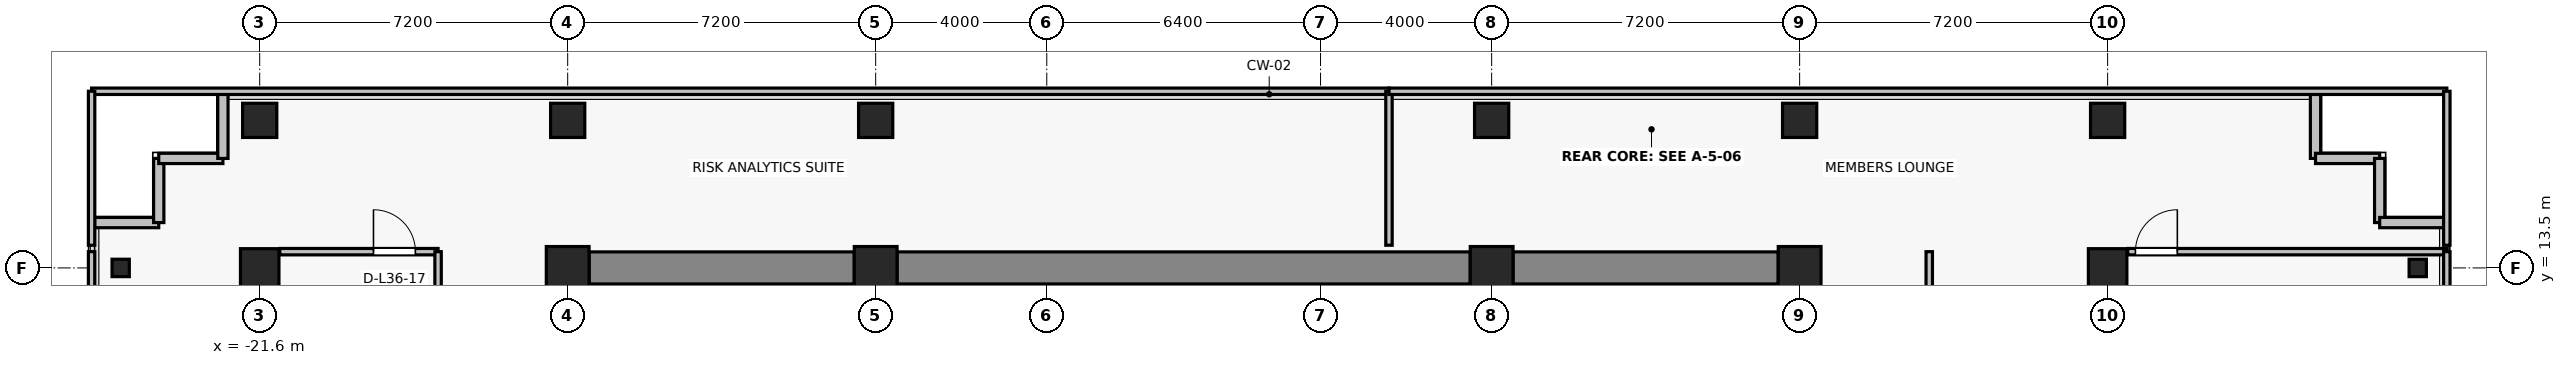
"""IFC4 building model, lengths in metres.
Left out: names, types, materials, properties, quantities, classifications, styles, units other than length and angle.
Written with IfcOpenShell. Run it as: python <this file> out.ifc"""

import sys

from ifc_helpers import new_model, si_unit, direction, frame, frame_2d, origin, origin_2d, place, context, subcontext, project, spatial, rectangle, i_section, extrude, source, transform, mapped, element, fill, save


model = new_model("IFC4")
c1 = context("Model", 3, precision=1e-05, world=origin(), true_north=direction((0.0, 1.0)))
c2 = subcontext(c1, "Body", "Model", "MODEL_VIEW")
j1 = project(units=[si_unit("LENGTHUNIT", "METRE"), si_unit("PLANEANGLEUNIT", "RADIAN")], contexts=[c1])
p1 = place(None, origin())
s1 = spatial("IfcSite", under=j1, at=p1, CompositionType="ELEMENT")
p2 = place(p1, origin())
s2 = spatial("IfcBuilding", under=s1, at=p2, CompositionType="ELEMENT")
p3 = place(p2, frame((0.0, 0.0, 129.7)))
s3 = spatial("IfcBuildingStorey", under=s2, at=p3, CompositionType="ELEMENT", Elevation=129.7)
for number, where, z_axis, x_axis in (
    (1, (-14.4, 13.5, 0.0), (0.0, 0.0, 1.0), (1.0, 0.0, 0.0)),
    (2, (-7.2, 13.5, 0.0), (0.0, 0.0, 1.0), (1.0, 0.0, 0.0)),
    (3, (7.2, 13.5, 0.0), (0.0, 0.0, 1.0), (1.0, 0.0, 0.0)),
    (4, (14.4, 13.5, 0.0), (0.0, 0.0, 1.0), (1.0, 0.0, 0.0)),
):
    element("IfcColumn", number, at=place(p3, frame(where, z_axis=z_axis, x_axis=x_axis)), inside=s3, PredefinedType="COLUMN", context=c2, shape_type="SweptSolid", body=[
        extrude(rectangle(XDim=1.0, YDim=1.0, at=origin_2d()), origin(), (0.0, 0.0, 1.0), 3.3),
    ])
for number, where, z_axis, x_axis in (
    (5, (-21.6, 13.5, 0.0), (0.0, 0.0, 1.0), (1.0, 0.0, 0.0)),
    (6, (21.6, 13.5, 0.0), (0.0, 0.0, 1.0), (1.0, 0.0, 0.0)),
):
    element("IfcColumn", number, at=place(p3, frame(where, z_axis=z_axis, x_axis=x_axis)), inside=s3, PredefinedType="COLUMN", context=c2, shape_type="SweptSolid", body=[
        extrude(rectangle(XDim=0.9, YDim=0.9, at=origin_2d()), origin(), (0.0, 0.0, 1.0), 3.3),
    ])
for number, where, z_axis, x_axis in (
    (7, (-14.4, 16.95, 0.0), (0.0, 0.0, 1.0), (1.0, 0.0, 0.0)),
    (8, (-7.2, 16.95, 0.0), (0.0, 0.0, 1.0), (1.0, 0.0, 0.0)),
    (9, (7.2, 16.95, 0.0), (0.0, 0.0, 1.0), (1.0, 0.0, 0.0)),
    (10, (14.4, 16.95, 0.0), (0.0, 0.0, 1.0), (1.0, 0.0, 0.0)),
    (11, (-21.6, 16.95, 0.0), (0.0, 0.0, 1.0), (1.0, 0.0, 0.0)),
    (12, (21.6, 16.95, 0.0), (0.0, 0.0, 1.0), (1.0, 0.0, 0.0)),
):
    element("IfcColumn", number, at=place(p3, frame(where, z_axis=z_axis, x_axis=x_axis)), inside=s3, PredefinedType="COLUMN", context=c2, shape_type="SweptSolid", body=[
        extrude(rectangle(XDim=0.8, YDim=0.8, at=origin_2d()), origin(), (0.0, 0.0, 1.0), 3.3),
    ])
for number, where, z_axis, x_axis in (
    (13, (-24.85, 13.5, 0.0), (0.0, 0.0, 1.0), (1.0, 0.0, 0.0)),
    (14, (28.85, 13.5, 0.0), (0.0, 0.0, 1.0), (1.0, 0.0, 0.0)),
):
    element("IfcColumn", number, at=place(p3, frame(where, z_axis=z_axis, x_axis=x_axis)), inside=s3, PredefinedType="COLUMN", context=c2, shape_type="SweptSolid", body=[
        extrude(i_section(OverallWidth=0.404, OverallDepth=0.407, WebThickness=0.022, FlangeThickness=0.032, FilletRadius=0.015, at=origin_2d()), origin(), (0.0, 0.0, 1.0), 3.3),
    ])
p4 = place(p3, frame((-13.9, 13.5, 0.0), z_axis=(0.0, 0.0, 1.0), x_axis=(1.0, 0.0, 0.0)))
e15 = element("IfcWall", 15, at=p4, inside=s3, PredefinedType="SHEAR", context=c2, shape_type="SweptSolid", body=[
    extrude(rectangle(XDim=6.2, YDim=0.75, at=frame_2d((3.1, 0.0))), origin(), (0.0, 0.0, 1.0), 3.075),
])
p5 = place(p3, frame((-6.7, 13.5, 0.0), z_axis=(0.0, 0.0, 1.0), x_axis=(1.0, 0.0, 0.0)))
e16 = element("IfcWall", 16, at=p5, inside=s3, PredefinedType="SHEAR", context=c2, shape_type="SweptSolid", body=[
    extrude(rectangle(XDim=13.4, YDim=0.75, at=frame_2d((6.7, 0.0))), origin(), (0.0, 0.0, 1.0), 3.075),
])
p6 = place(p3, frame((7.7, 13.5, 0.0), z_axis=(0.0, 0.0, 1.0), x_axis=(1.0, 0.0, 0.0)))
e17 = element("IfcWall", 17, at=p6, inside=s3, PredefinedType="SHEAR", context=c2, shape_type="SweptSolid", body=[
    extrude(rectangle(XDim=6.2, YDim=0.75, at=frame_2d((3.1, 0.0))), origin(), (0.0, 0.0, 1.0), 3.075),
])
for number, where, z_axis, x_axis in (
    (18, (-23.96, 14.56, 0.0), (0.0, 0.0, 1.0), (-1.0, 0.0, 0.0)),
    (19, (-23.96, 16.06, 0.0), (0.0, 0.0, 1.0), (0.0, -1.0, 0.0)),
    (20, (-22.46, 16.06, 0.0), (0.0, 0.0, 1.0), (-1.0, 0.0, 0.0)),
):
    element("IfcWall", number, at=place(p3, frame(where, z_axis=z_axis, x_axis=x_axis)), inside=s3, PredefinedType="SOLIDWALL", context=c2, shape_type="SweptSolid", body=[
        extrude(rectangle(XDim=1.5, YDim=0.24, at=frame_2d((0.75, 0.0))), origin(), (0.0, 0.0, 1.0), 3.075),
    ])
p7 = place(p3, frame((-22.46, 17.56, 0.0), z_axis=(0.0, 0.0, 1.0), x_axis=(0.0, -1.0, 0.0)))
e21 = element("IfcWall", 21, at=p7, inside=s3, PredefinedType="SOLIDWALL", context=c2, shape_type="SweptSolid", body=[
    extrude(rectangle(XDim=1.5, YDim=0.24, at=frame_2d((0.75, 0.0))), origin(), (0.0, 0.0, 1.0), 2.565),
])
for number, where, z_axis, x_axis in (
    (22, (26.46, 16.06, 0.0), (0.0, 0.0, 1.0), (0.0, 1.0, 0.0)),
    (23, (27.96, 16.06, 0.0), (0.0, 0.0, 1.0), (-1.0, 0.0, 0.0)),
    (24, (27.96, 14.56, 0.0), (0.0, 0.0, 1.0), (0.0, 1.0, 0.0)),
    (25, (29.46, 14.56, 0.0), (0.0, 0.0, 1.0), (-1.0, 0.0, 0.0)),
):
    element("IfcWall", number, at=place(p3, frame(where, z_axis=z_axis, x_axis=x_axis)), inside=s3, PredefinedType="SOLIDWALL", context=c2, shape_type="SweptSolid", body=[
        extrude(rectangle(XDim=1.5, YDim=0.24, at=frame_2d((0.75, 0.0))), origin(), (0.0, 0.0, 1.0), 3.075),
    ])
p8 = place(p3, frame((-21.13, 13.88, 0.0), z_axis=(0.0, 0.0, 1.0), x_axis=(1.0, 0.0, 0.0)))
e26 = element("IfcWall", 26, at=p8, inside=s3, PredefinedType="PARTITIONING", context=c2, shape_type="SweptSolid", body=[
    extrude(rectangle(XDim=3.7, YDim=0.15, at=frame_2d((1.85, 0.0))), origin(), (0.0, 0.0, 1.0), 3.075),
])
p9 = place(p8, frame((2.19, 0.0, 0.0)))
e27 = element("IfcOpeningElement", 27, at=p9, cuts=e26, PredefinedType="OPENING", context=c2, shape_type="SweptSolid", body=[
    extrude(rectangle(XDim=0.98, YDim=2.15, at=frame_2d((0.49, 1.075))), frame((0.0, 0.085, 0.0), z_axis=(0.0, -1.0, 0.0), x_axis=(1.0, 0.0, 0.0)), (0.0, 0.0, 1.0), 0.17),
])
p10 = place(p3, frame((-25.53, -1.77, 0.0), z_axis=(0.0, 0.0, 1.0), x_axis=(0.0, 1.0, 0.0)))
e28 = element("IfcWall", 28, at=p10, inside=s3, PredefinedType="PARTITIONING", context=c2, shape_type="SweptSolid", body=[
    extrude(rectangle(XDim=15.65, YDim=0.15, at=frame_2d((7.825, 0.0))), origin(), (0.0, 0.0, 1.0), 3.075),
])
p11 = place(p3, frame((-17.43, 13.88, 0.0), z_axis=(0.0, 0.0, 1.0), x_axis=(0.0, -1.0, 0.0)))
e29 = element("IfcWall", 29, at=p11, inside=s3, PredefinedType="PARTITIONING", context=c2, shape_type="SweptSolid", body=[
    extrude(rectangle(XDim=15.65, YDim=0.15, at=frame_2d((7.825, 0.0))), origin(), (0.0, 0.0, 1.0), 2.515),
])
p12 = place(p11, frame((7.335, 0.0, 0.0)))
e30 = element("IfcOpeningElement", 30, at=p12, cuts=e29, PredefinedType="OPENING", context=c2, shape_type="SweptSolid", body=[
    extrude(rectangle(XDim=0.98, YDim=2.15, at=frame_2d((0.49, 1.075))), frame((0.0, 0.085, 0.0), z_axis=(0.0, -1.0, 0.0), x_axis=(1.0, 0.0, 0.0)), (0.0, 0.0, 1.0), 0.17),
])
p13 = place(p3, frame((22.07, 13.88, 0.0), z_axis=(0.0, 0.0, 1.0), x_axis=(1.0, 0.0, 0.0)))
e31 = element("IfcWall", 31, at=p13, inside=s3, PredefinedType="PARTITIONING", context=c2, shape_type="SweptSolid", body=[
    extrude(rectangle(XDim=7.46, YDim=0.15, at=frame_2d((3.73, 0.0))), origin(), (0.0, 0.0, 1.0), 3.075),
])
p14 = place(p13, frame((0.18, 0.0, 0.0)))
e32 = element("IfcOpeningElement", 32, at=p14, cuts=e31, PredefinedType="OPENING", context=c2, shape_type="SweptSolid", body=[
    extrude(rectangle(XDim=0.98, YDim=2.15, at=frame_2d((0.49, 1.075))), frame((0.0, 0.085, 0.0), z_axis=(0.0, -1.0, 0.0), x_axis=(1.0, 0.0, 0.0)), (0.0, 0.0, 1.0), 0.17),
])
p15 = place(p3, frame((17.43, 6.677, 0.0), z_axis=(0.0, 0.0, 1.0), x_axis=(0.0, 1.0, 0.0)))
e33 = element("IfcWall", 33, at=p15, inside=s3, PredefinedType="PARTITIONING", context=c2, shape_type="SweptSolid", body=[
    extrude(rectangle(XDim=7.203, YDim=0.15, at=frame_2d((3.602, 0.0))), origin(), (0.0, 0.0, 1.0), 2.515),
])
p16 = place(p15, frame((3.111, 0.0, 0.0)))
e34 = element("IfcOpeningElement", 34, at=p16, cuts=e33, PredefinedType="OPENING", context=c2, shape_type="SweptSolid", body=[
    extrude(rectangle(XDim=0.98, YDim=2.15, at=frame_2d((0.49, 1.075))), frame((0.0, 0.085, 0.0), z_axis=(0.0, -1.0, 0.0), x_axis=(1.0, 0.0, 0.0)), (0.0, 0.0, 1.0), 0.17),
])
p17 = place(p3, frame((29.53, 13.88, 0.0), z_axis=(0.0, 0.0, 1.0), x_axis=(0.0, -1.0, 0.0)))
e35 = element("IfcWall", 35, at=p17, inside=s3, PredefinedType="PARTITIONING", context=c2, shape_type="SweptSolid", body=[
    extrude(rectangle(XDim=7.203, YDim=0.15, at=frame_2d((3.602, 0.0))), origin(), (0.0, 0.0, 1.0), 3.075),
])
p18 = place(p3, frame((-25.53, 17.63, 0.0), z_axis=(0.0, 0.0, 1.0), x_axis=(1.0, 0.0, 0.0)))
e36 = element("IfcWall", 36, at=p18, inside=s3, PredefinedType="PARTITIONING", context=c2, shape_type="SweptSolid", body=[
    extrude(rectangle(XDim=30.33, YDim=0.15, at=frame_2d((15.165, 0.0))), origin(), (0.0, 0.0, 1.0), 3.075),
])
p19 = place(p3, frame((-25.53, 14.03, 0.0), z_axis=(0.0, 0.0, 1.0), x_axis=(0.0, 1.0, 0.0)))
e37 = element("IfcWall", 37, at=p19, inside=s3, PredefinedType="PARTITIONING", context=c2, shape_type="SweptSolid", body=[
    extrude(rectangle(XDim=3.6, YDim=0.15, at=frame_2d((1.8, 0.0))), origin(), (0.0, 0.0, 1.0), 3.075),
])
p20 = place(p3, frame((4.8, 17.63, 0.0), z_axis=(0.0, 0.0, 1.0), x_axis=(0.0, -1.0, 0.0)))
e38 = element("IfcWall", 38, at=p20, inside=s3, PredefinedType="PARTITIONING", context=c2, shape_type="SweptSolid", body=[
    extrude(rectangle(XDim=3.6, YDim=0.15, at=frame_2d((1.8, 0.0))), origin(), (0.0, 0.0, 1.0), 2.565),
])
p21 = place(p3, frame((4.8, 17.63, 0.0), z_axis=(0.0, 0.0, 1.0), x_axis=(1.0, 0.0, 0.0)))
e39 = element("IfcWall", 39, at=p21, inside=s3, PredefinedType="PARTITIONING", context=c2, shape_type="SweptSolid", body=[
    extrude(rectangle(XDim=24.73, YDim=0.15, at=frame_2d((12.365, 0.0))), origin(), (0.0, 0.0, 1.0), 3.075),
])
p22 = place(p3, frame((29.53, 17.63, 0.0), z_axis=(0.0, 0.0, 1.0), x_axis=(0.0, -1.0, 0.0)))
e40 = element("IfcWall", 40, at=p22, inside=s3, PredefinedType="PARTITIONING", context=c2, shape_type="SweptSolid", body=[
    extrude(rectangle(XDim=3.6, YDim=0.15, at=frame_2d((1.8, 0.0))), origin(), (0.0, 0.0, 1.0), 3.075),
])
m1 = source(origin(), c2, "Body", "SweptSolid", [
    extrude(rectangle(XDim=0.98, YDim=2.15, at=frame_2d((0.49, 1.075))), frame((0.0, 0.025, 0.0), z_axis=(0.0, -1.0, 0.0), x_axis=(1.0, 0.0, 0.0)), (0.0, 0.0, 1.0), 0.05),
])
p23 = place(p9, origin())
e41 = element("IfcDoor", 41, at=p23, inside=s3, OperationType="SINGLE_SWING_LEFT", PredefinedType="DOOR", context=c2, shape_type="MappedRepresentation", body=[
    mapped(m1, transform((0.0, 0.0, 0.0), x_axis=(1.0, 0.0, 0.0), y_axis=(0.0, 1.0, 0.0), z_axis=(0.0, 0.0, 1.0), scale=1.0)),
])
fill(e27, e41)
p24 = place(p14, origin())
e42 = element("IfcDoor", 42, at=p24, inside=s3, OperationType="SINGLE_SWING_RIGHT", PredefinedType="DOOR", context=c2, shape_type="MappedRepresentation", body=[
    mapped(m1, transform((0.0, 0.0, 0.0), x_axis=(1.0, 0.0, 0.0), y_axis=(0.0, 1.0, 0.0), z_axis=(0.0, 0.0, 1.0), scale=1.0)),
])
fill(e32, e42)
save(model, sys.argv[1])
